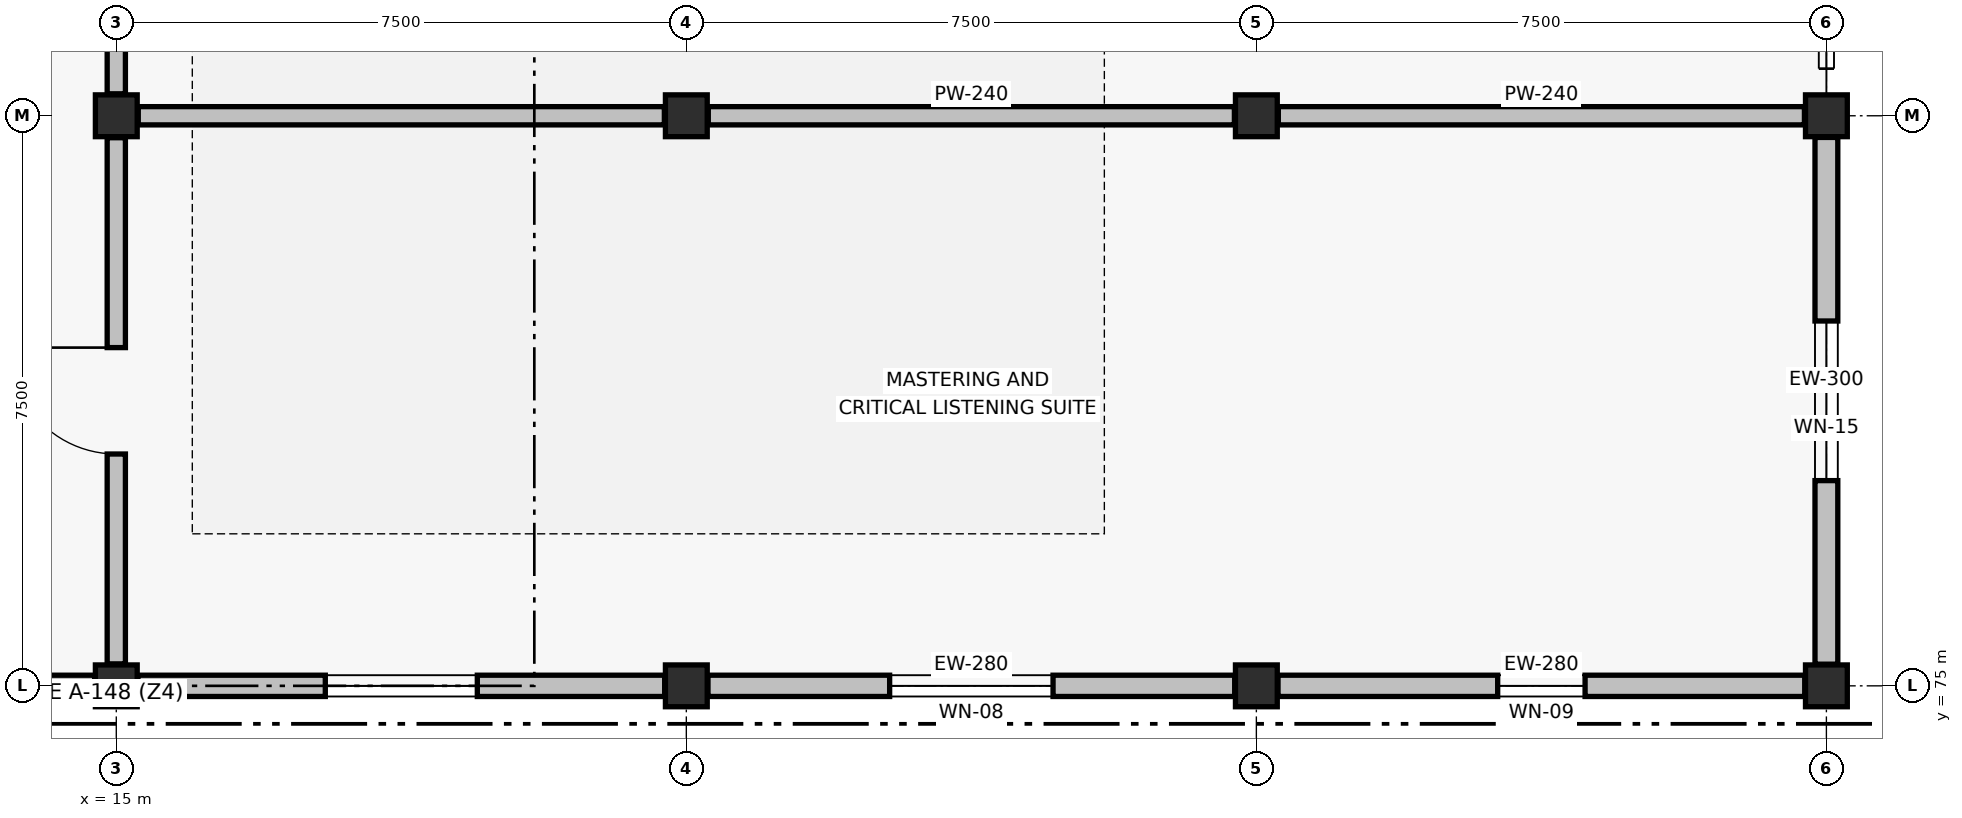
"""IFC4 building model, lengths in metres.
Left out: names, types, materials, properties, quantities, classifications, styles, units other than length and angle.
Written with IfcOpenShell. Run it as: python <this file> out.ifc"""

import sys

from ifc_helpers import new_model, si_unit, direction, frame, frame_2d, origin, origin_2d, place, context, subcontext, project, spatial, rectangle, extrude, element, fill, save


model = new_model("IFC4")
c1 = context("Model", 3, precision=1e-05, world=origin(), true_north=direction((0.0, 1.0)))
c2 = subcontext(c1, "Body", "Model", "MODEL_VIEW")
j1 = project(units=[si_unit("LENGTHUNIT", "METRE"), si_unit("PLANEANGLEUNIT", "RADIAN")], contexts=[c1])
p1 = place(None, origin())
s1 = spatial("IfcSite", under=j1, at=p1, CompositionType="ELEMENT")
p2 = place(p1, origin())
s2 = spatial("IfcBuilding", under=s1, at=p2, CompositionType="ELEMENT")
p3 = place(p2, frame((0.0, 0.0, 13.2)))
s3 = spatial("IfcBuildingStorey", under=s2, at=p3, CompositionType="ELEMENT", Elevation=13.2)
for number, where, z_axis, x_axis in (
    (1, (15.0, 75.0, 0.0), (0.0, 0.0, 1.0), (1.0, 0.0, 0.0)),
    (2, (15.0, 82.5, 0.0), (0.0, 0.0, 1.0), (1.0, 0.0, 0.0)),
    (3, (22.5, 75.0, 0.0), (0.0, 0.0, 1.0), (1.0, 0.0, 0.0)),
    (4, (22.5, 82.5, 0.0), (0.0, 0.0, 1.0), (1.0, 0.0, 0.0)),
    (5, (30.0, 75.0, 0.0), (0.0, 0.0, 1.0), (1.0, 0.0, 0.0)),
    (6, (30.0, 82.5, 0.0), (0.0, 0.0, 1.0), (1.0, 0.0, 0.0)),
    (7, (37.5, 75.0, 0.0), (0.0, 0.0, 1.0), (1.0, 0.0, 0.0)),
    (8, (37.5, 82.5, 0.0), (0.0, 0.0, 1.0), (1.0, 0.0, 0.0)),
):
    element("IfcColumn", number, at=place(p3, frame(where, z_axis=z_axis, x_axis=x_axis)), inside=s3, PredefinedType="COLUMN", context=c2, shape_type="SweptSolid", body=[
        extrude(rectangle(XDim=0.55, YDim=0.55, at=origin_2d()), origin(), (0.0, 0.0, 1.0), 3.9),
    ])
p4 = place(p3, frame((8.12, 75.0, 0.0), z_axis=(0.0, 0.0, 1.0), x_axis=(1.0, 0.0, 0.0)))
e9 = element("IfcWall", 9, at=p4, inside=s3, PredefinedType="SOLIDWALL", context=c2, shape_type="SweptSolid", body=[
    extrude(rectangle(XDim=6.595, YDim=0.28, at=frame_2d((3.297, 0.0))), origin(), (0.0, 0.0, 1.0), 2.59),
])
p5 = place(p4, frame((2.205, 0.0, 0.6)))
e10 = element("IfcOpeningElement", 10, at=p5, cuts=e9, PredefinedType="OPENING", context=c2, shape_type="SweptSolid", body=[
    extrude(rectangle(XDim=1.85, YDim=1.8, at=frame_2d((0.925, 0.9))), frame((0.0, 0.15, 0.0), z_axis=(0.0, -1.0, 0.0), x_axis=(1.0, 0.0, 0.0)), (0.0, 0.0, 1.0), 0.3),
])
p6 = place(p3, frame((15.285, 75.0, 0.0), z_axis=(0.0, 0.0, 1.0), x_axis=(1.0, 0.0, 0.0)))
e11 = element("IfcWall", 11, at=p6, inside=s3, PredefinedType="SOLIDWALL", context=c2, shape_type="SweptSolid", body=[
    extrude(rectangle(XDim=6.93, YDim=0.28, at=frame_2d((3.465, 0.0))), origin(), (0.0, 0.0, 1.0), 2.59),
])
p7 = place(p6, frame((2.465, 0.0, 0.6)))
e12 = element("IfcOpeningElement", 12, at=p7, cuts=e11, PredefinedType="OPENING", context=c2, shape_type="SweptSolid", body=[
    extrude(rectangle(XDim=2.0, YDim=1.45, at=frame_2d((1.0, 0.725))), frame((0.0, 0.15, 0.0), z_axis=(0.0, -1.0, 0.0), x_axis=(1.0, 0.0, 0.0)), (0.0, 0.0, 1.0), 0.3),
])
p8 = place(p3, frame((22.785, 75.0, 0.0), z_axis=(0.0, 0.0, 1.0), x_axis=(1.0, 0.0, 0.0)))
e13 = element("IfcWall", 13, at=p8, inside=s3, PredefinedType="SOLIDWALL", context=c2, shape_type="SweptSolid", body=[
    extrude(rectangle(XDim=6.93, YDim=0.28, at=frame_2d((3.465, 0.0))), origin(), (0.0, 0.0, 1.0), 2.84),
])
p9 = place(p8, frame((2.39, 0.0, 0.6)))
e14 = element("IfcOpeningElement", 14, at=p9, cuts=e13, PredefinedType="OPENING", context=c2, shape_type="SweptSolid", body=[
    extrude(rectangle(XDim=2.15, YDim=1.45, at=frame_2d((1.075, 0.725))), frame((0.0, 0.15, 0.0), z_axis=(0.0, -1.0, 0.0), x_axis=(1.0, 0.0, 0.0)), (0.0, 0.0, 1.0), 0.3),
])
p10 = place(p3, frame((30.285, 75.0, 0.0), z_axis=(0.0, 0.0, 1.0), x_axis=(1.0, 0.0, 0.0)))
e15 = element("IfcWall", 15, at=p10, inside=s3, PredefinedType="SOLIDWALL", context=c2, shape_type="SweptSolid", body=[
    extrude(rectangle(XDim=6.93, YDim=0.28, at=frame_2d((3.465, 0.0))), origin(), (0.0, 0.0, 1.0), 2.84),
])
p11 = place(p10, frame((2.89, 0.0, 0.6)))
e16 = element("IfcOpeningElement", 16, at=p11, cuts=e15, PredefinedType="OPENING", context=c2, shape_type="SweptSolid", body=[
    extrude(rectangle(XDim=1.15, YDim=1.3, at=frame_2d((0.575, 0.65))), frame((0.0, 0.15, 0.0), z_axis=(0.0, -1.0, 0.0), x_axis=(1.0, 0.0, 0.0)), (0.0, 0.0, 1.0), 0.3),
])
p12 = place(p3, frame((37.5, 75.285, 0.0), z_axis=(0.0, 0.0, 1.0), x_axis=(0.0, 1.0, 0.0)))
e17 = element("IfcWall", 17, at=p12, inside=s3, PredefinedType="SOLIDWALL", context=c2, shape_type="SweptSolid", body=[
    extrude(rectangle(XDim=6.93, YDim=0.3, at=frame_2d((3.465, 0.0))), origin(), (0.0, 0.0, 1.0), 2.54),
])
p13 = place(p12, frame((2.415, 0.0, 0.6)))
e18 = element("IfcOpeningElement", 18, at=p13, cuts=e17, PredefinedType="OPENING", context=c2, shape_type="SweptSolid", body=[
    extrude(rectangle(XDim=2.1, YDim=1.3, at=frame_2d((1.05, 0.65))), frame((0.0, 0.16, 0.0), z_axis=(0.0, -1.0, 0.0), x_axis=(1.0, 0.0, 0.0)), (0.0, 0.0, 1.0), 0.32),
])
p14 = place(p3, frame((15.289, 82.5, 0.0), z_axis=(0.0, 0.0, 1.0), x_axis=(1.0, 0.0, 0.0)))
e19 = element("IfcWall", 19, at=p14, inside=s3, PredefinedType="PARTITIONING", context=c2, shape_type="SweptSolid", body=[
    extrude(rectangle(XDim=6.922, YDim=0.24, at=frame_2d((3.461, 0.0))), origin(), (0.0, 0.0, 1.0), 2.59),
])
for number, where, z_axis, x_axis in (
    (20, (22.789, 82.5, 0.0), (0.0, 0.0, 1.0), (1.0, 0.0, 0.0)),
    (21, (30.289, 82.5, 0.0), (0.0, 0.0, 1.0), (1.0, 0.0, 0.0)),
):
    element("IfcWall", number, at=place(p3, frame(where, z_axis=z_axis, x_axis=x_axis)), inside=s3, PredefinedType="PARTITIONING", context=c2, shape_type="SweptSolid", body=[
        extrude(rectangle(XDim=6.922, YDim=0.24, at=frame_2d((3.461, 0.0))), origin(), (0.0, 0.0, 1.0), 2.54),
    ])
p15 = place(p3, frame((15.0, 75.289, 0.0), z_axis=(0.0, 0.0, 1.0), x_axis=(0.0, 1.0, 0.0)))
e22 = element("IfcWall", 22, at=p15, inside=s3, PredefinedType="PARTITIONING", context=c2, shape_type="SweptSolid", body=[
    extrude(rectangle(XDim=6.922, YDim=0.24, at=frame_2d((3.461, 0.0))), origin(), (0.0, 0.0, 1.0), 2.59),
])
p16 = place(p15, frame((2.761, 0.0, 0.0)))
e23 = element("IfcOpeningElement", 23, at=p16, cuts=e22, PredefinedType="OPENING", context=c2, shape_type="SweptSolid", body=[
    extrude(rectangle(XDim=1.4, YDim=2.14, at=frame_2d((0.7, 1.07))), frame((0.0, 0.13, 0.0), z_axis=(0.0, -1.0, 0.0), x_axis=(1.0, 0.0, 0.0)), (0.0, 0.0, 1.0), 0.26),
])
p17 = place(p3, frame((15.0, 82.789, 0.0), z_axis=(0.0, 0.0, 1.0), x_axis=(0.0, 1.0, 0.0)))
e24 = element("IfcWall", 24, at=p17, inside=s3, PredefinedType="PARTITIONING", context=c2, shape_type="SweptSolid", body=[
    extrude(rectangle(XDim=6.922, YDim=0.24, at=frame_2d((3.461, 0.0))), origin(), (0.0, 0.0, 1.0), 2.59),
])
p18 = place(p17, frame((2.761, 0.0, 0.0)))
e25 = element("IfcOpeningElement", 25, at=p18, cuts=e24, PredefinedType="OPENING", context=c2, shape_type="SweptSolid", body=[
    extrude(rectangle(XDim=1.4, YDim=2.14, at=frame_2d((0.7, 1.07))), frame((0.0, 0.13, 0.0), z_axis=(0.0, -1.0, 0.0), x_axis=(1.0, 0.0, 0.0)), (0.0, 0.0, 1.0), 0.26),
])
p19 = place(p7, origin())
e26 = element("IfcWindow", 26, at=p19, inside=s3, PartitioningType="SINGLE_PANEL", PredefinedType="WINDOW", context=c2, shape_type="SweptSolid", body=[
    extrude(rectangle(XDim=2.0, YDim=1.45, at=frame_2d((1.0, 0.725))), frame((0.0, 0.03, 0.0), z_axis=(0.0, -1.0, 0.0), x_axis=(1.0, 0.0, 0.0)), (0.0, 0.0, 1.0), 0.06),
])
fill(e12, e26)
p20 = place(p9, origin())
e27 = element("IfcWindow", 27, at=p20, inside=s3, PartitioningType="SINGLE_PANEL", PredefinedType="WINDOW", context=c2, shape_type="SweptSolid", body=[
    extrude(rectangle(XDim=2.15, YDim=1.45, at=frame_2d((1.075, 0.725))), frame((0.0, 0.03, 0.0), z_axis=(0.0, -1.0, 0.0), x_axis=(1.0, 0.0, 0.0)), (0.0, 0.0, 1.0), 0.06),
])
fill(e14, e27)
p21 = place(p11, origin())
e28 = element("IfcWindow", 28, at=p21, inside=s3, PartitioningType="SINGLE_PANEL", PredefinedType="WINDOW", context=c2, shape_type="SweptSolid", body=[
    extrude(rectangle(XDim=1.15, YDim=1.3, at=frame_2d((0.575, 0.65))), frame((0.0, 0.03, 0.0), z_axis=(0.0, -1.0, 0.0), x_axis=(1.0, 0.0, 0.0)), (0.0, 0.0, 1.0), 0.06),
])
fill(e16, e28)
p22 = place(p13, origin())
e29 = element("IfcWindow", 29, at=p22, inside=s3, PartitioningType="SINGLE_PANEL", PredefinedType="WINDOW", context=c2, shape_type="SweptSolid", body=[
    extrude(rectangle(XDim=2.1, YDim=1.3, at=frame_2d((1.05, 0.65))), frame((0.0, 0.03, 0.0), z_axis=(0.0, -1.0, 0.0), x_axis=(1.0, 0.0, 0.0)), (0.0, 0.0, 1.0), 0.06),
])
fill(e18, e29)
p23 = place(p16, origin())
e30 = element("IfcDoor", 30, at=p23, inside=s3, OperationType="SINGLE_SWING_RIGHT", PredefinedType="DOOR", context=c2, shape_type="SweptSolid", body=[
    extrude(rectangle(XDim=1.4, YDim=2.14, at=frame_2d((0.7, 1.07))), frame((0.0, 0.025, 0.0), z_axis=(0.0, -1.0, 0.0), x_axis=(1.0, 0.0, 0.0)), (0.0, 0.0, 1.0), 0.05),
])
fill(e23, e30)
save(model, sys.argv[1])
